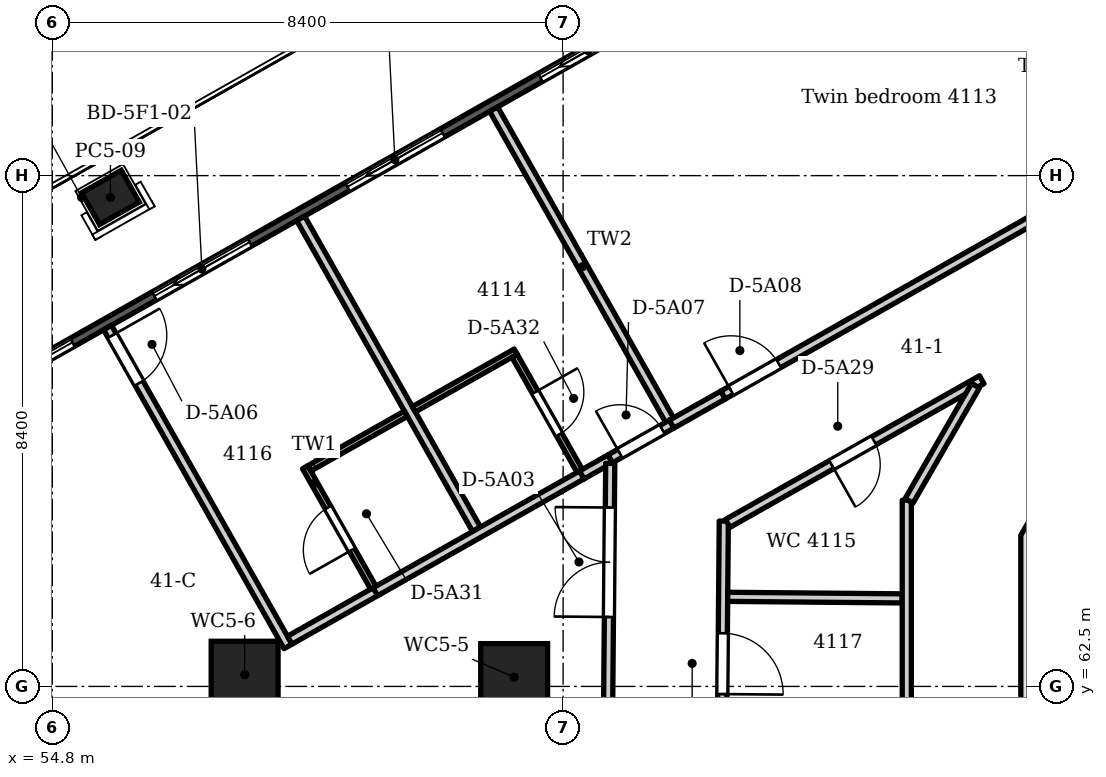
"""IFC4 building model, lengths in metres.
Left out: names, types, materials, properties, quantities, classifications, styles, units other than length and angle.
Written with IfcOpenShell. Run it as: python <this file> out.ifc"""

import sys

from ifc_helpers import new_model, si_unit, direction, frame, frame_2d, origin, origin_2d, place, context, subcontext, project, spatial, polyline, rectangle, circle, outline, extrude, element, fill, save


model = new_model("IFC4")
c1 = context("Model", 3, precision=1e-05, world=origin(), true_north=direction((0.0, 1.0)))
c2 = subcontext(c1, "Body", "Model", "MODEL_VIEW")
j1 = project(units=[si_unit("LENGTHUNIT", "METRE"), si_unit("PLANEANGLEUNIT", "RADIAN")], contexts=[c1])
p1 = place(None, origin())
s1 = spatial("IfcSite", under=j1, at=p1, CompositionType="ELEMENT")
p2 = place(p1, origin())
s2 = spatial("IfcBuilding", under=s1, at=p2, CompositionType="ELEMENT")
p3 = place(p2, frame((0.0, 0.0, 161.1)))
s3 = spatial("IfcBuildingStorey", under=s2, at=p3, CompositionType="ELEMENT", Elevation=161.1)
p4 = place(p3, frame((73.602, 69.063, 0.0), z_axis=(0.0, 0.0, 1.0), x_axis=(-0.500038571144, -0.866003133579, 0.0)))
e1 = element("IfcWall", 1, at=p4, inside=s3, PredefinedType="SHEAR", context=c2, shape_type="SweptSolid", body=[
    extrude(outline(polyline([(0.0, -0.45), (4.969, -0.45), (4.728, 0.45), (0.241, 0.45), (0.0, -0.45)])), origin(), (0.0, 0.0, 1.0), 3.6),
])
p5 = place(p4, frame((1.285, 0.0, 0.0)))
e2 = element("IfcOpeningElement", 2, at=p5, cuts=e1, PredefinedType="OPENING", context=c2, shape_type="SweptSolid", body=[
    extrude(rectangle(XDim=2.4, YDim=2.1, at=frame_2d((1.2, 1.05))), frame((0.0, 0.46, 0.0), z_axis=(0.0, -1.0, 0.0), x_axis=(1.0, 0.0, 0.0)), (0.0, 0.0, 1.0), 0.92),
])
p6 = place(p3, frame((71.177, 64.985, 0.0), z_axis=(0.0, 0.0, 1.0), x_axis=(0.0, -1.0, 0.0)))
e3 = element("IfcWall", 3, at=p6, inside=s3, PredefinedType="SHEAR", context=c2, shape_type="SweptSolid", body=[
    extrude(outline(polyline([(0.0, -0.45), (4.969, -0.45), (4.728, 0.45), (0.241, 0.45), (0.0, -0.45)])), origin(), (0.0, 0.0, 1.0), 3.6),
])
p7 = place(p6, frame((0.894, 0.0, 0.0)))
e4 = element("IfcOpeningElement", 4, at=p7, cuts=e3, PredefinedType="OPENING", context=c2, shape_type="SweptSolid", body=[
    extrude(rectangle(XDim=0.9, YDim=2.1, at=frame_2d((0.45, 1.05))), frame((0.0, 0.46, 0.0), z_axis=(0.0, -1.0, 0.0), x_axis=(1.0, 0.0, 0.0)), (0.0, 0.0, 1.0), 0.92),
])
p8 = place(p6, frame((3.185, 0.0, 0.0)))
e5 = element("IfcOpeningElement", 5, at=p8, cuts=e3, PredefinedType="OPENING", context=c2, shape_type="SweptSolid", body=[
    extrude(rectangle(XDim=0.9, YDim=2.1, at=frame_2d((0.45, 1.05))), frame((0.0, 0.46, 0.0), z_axis=(0.0, -1.0, 0.0), x_axis=(1.0, 0.0, 0.0)), (0.0, 0.0, 1.0), 0.92),
])
p9 = place(p3, frame((55.756, 70.542, -0.35), z_axis=(0.0, 0.0, 1.0), x_axis=(0.87035569594, 0.492423560103, 0.0)))
e6 = element("IfcColumn", 6, at=p9, inside=s3, PredefinedType="COLUMN", context=c2, shape_type="SweptSolid", body=[
    extrude(rectangle(XDim=0.75, YDim=0.6, at=origin_2d()), origin(), (0.0, 0.0, 1.0), 3.95),
])
for number, where, z_axis, x_axis in (
    (7, (62.395, 62.654, -0.35), (0.0, 0.0, 1.0), (1.0, 0.0, 0.0)),
    (8, (57.963, 62.692, -0.35), (0.0, 0.0, 1.0), (1.0, 0.0, 0.0)),
):
    element("IfcColumn", number, at=place(p3, frame(where, z_axis=z_axis, x_axis=x_axis)), inside=s3, PredefinedType="COLUMN", context=c2, shape_type="SweptSolid", body=[
        extrude(circle(Radius=0.55, at=origin_2d()), origin(), (0.0, 0.0, 1.0), 3.95),
    ])
p10 = place(p3, frame((52.498, 66.67, 0.0), z_axis=(0.0, 0.0, 1.0), x_axis=(0.870354973249, 0.492424837453, 0.0)))
e9 = element("IfcWall", 9, at=p10, inside=s3, PredefinedType="SOLIDWALL", context=c2, shape_type="SweptSolid", body=[
    extrude(outline(polyline([(0.149, 0.075), (0.149, -0.075), (43.617, -0.075), (43.617, 0.075), (0.149, 0.075)])), origin(), (0.0, 0.0, 1.0), 3.3),
])
p11 = place(p10, frame((1.224, 0.0, 0.0)))
e10 = element("IfcOpeningElement", 10, at=p11, cuts=e9, PredefinedType="OPENING", context=c2, shape_type="SweptSolid", body=[
    extrude(rectangle(XDim=1.8, YDim=2.6, at=frame_2d((0.9, 1.3))), frame((0.0, 0.085, 0.0), z_axis=(0.0, -1.0, 0.0), x_axis=(1.0, 0.0, 0.0)), (0.0, 0.0, 1.0), 0.17),
])
p12 = place(p10, frame((4.571, 0.0, 0.0)))
e11 = element("IfcOpeningElement", 11, at=p12, cuts=e9, PredefinedType="OPENING", context=c2, shape_type="SweptSolid", body=[
    extrude(rectangle(XDim=1.8, YDim=2.6, at=frame_2d((0.9, 1.3))), frame((0.0, 0.085, 0.0), z_axis=(0.0, -1.0, 0.0), x_axis=(1.0, 0.0, 0.0)), (0.0, 0.0, 1.0), 0.17),
])
p13 = place(p10, frame((8.218, 0.0, 0.0)))
e12 = element("IfcOpeningElement", 12, at=p13, cuts=e9, PredefinedType="OPENING", context=c2, shape_type="SweptSolid", body=[
    extrude(rectangle(XDim=1.8, YDim=2.6, at=frame_2d((0.9, 1.3))), frame((0.0, 0.085, 0.0), z_axis=(0.0, -1.0, 0.0), x_axis=(1.0, 0.0, 0.0)), (0.0, 0.0, 1.0), 0.17),
])
p14 = place(p10, frame((11.865, 0.0, 0.0)))
e13 = element("IfcOpeningElement", 13, at=p14, cuts=e9, PredefinedType="OPENING", context=c2, shape_type="SweptSolid", body=[
    extrude(rectangle(XDim=1.8, YDim=2.6, at=frame_2d((0.9, 1.3))), frame((0.0, 0.085, 0.0), z_axis=(0.0, -1.0, 0.0), x_axis=(1.0, 0.0, 0.0)), (0.0, 0.0, 1.0), 0.17),
])
p15 = place(p10, frame((15.512, 0.0, 0.0)))
e14 = element("IfcOpeningElement", 14, at=p15, cuts=e9, PredefinedType="OPENING", context=c2, shape_type="SweptSolid", body=[
    extrude(rectangle(XDim=1.8, YDim=2.6, at=frame_2d((0.9, 1.3))), frame((0.0, 0.085, 0.0), z_axis=(0.0, -1.0, 0.0), x_axis=(1.0, 0.0, 0.0)), (0.0, 0.0, 1.0), 0.17),
])
p16 = place(p10, frame((19.16, 0.0, 0.0)))
e15 = element("IfcOpeningElement", 15, at=p16, cuts=e9, PredefinedType="OPENING", context=c2, shape_type="SweptSolid", body=[
    extrude(rectangle(XDim=1.8, YDim=2.6, at=frame_2d((0.9, 1.3))), frame((0.0, 0.085, 0.0), z_axis=(0.0, -1.0, 0.0), x_axis=(1.0, 0.0, 0.0)), (0.0, 0.0, 1.0), 0.17),
])
p17 = place(p10, frame((22.807, 0.0, 0.0)))
e16 = element("IfcOpeningElement", 16, at=p17, cuts=e9, PredefinedType="OPENING", context=c2, shape_type="SweptSolid", body=[
    extrude(rectangle(XDim=1.8, YDim=2.6, at=frame_2d((0.9, 1.3))), frame((0.0, 0.085, 0.0), z_axis=(0.0, -1.0, 0.0), x_axis=(1.0, 0.0, 0.0)), (0.0, 0.0, 1.0), 0.17),
])
p18 = place(p10, frame((26.454, 0.0, 0.0)))
e17 = element("IfcOpeningElement", 17, at=p18, cuts=e9, PredefinedType="OPENING", context=c2, shape_type="SweptSolid", body=[
    extrude(rectangle(XDim=1.8, YDim=2.6, at=frame_2d((0.9, 1.3))), frame((0.0, 0.085, 0.0), z_axis=(0.0, -1.0, 0.0), x_axis=(1.0, 0.0, 0.0)), (0.0, 0.0, 1.0), 0.17),
])
p19 = place(p10, frame((30.101, 0.0, 0.0)))
e18 = element("IfcOpeningElement", 18, at=p19, cuts=e9, PredefinedType="OPENING", context=c2, shape_type="SweptSolid", body=[
    extrude(rectangle(XDim=1.8, YDim=2.6, at=frame_2d((0.9, 1.3))), frame((0.0, 0.085, 0.0), z_axis=(0.0, -1.0, 0.0), x_axis=(1.0, 0.0, 0.0)), (0.0, 0.0, 1.0), 0.17),
])
p20 = place(p10, frame((33.748, 0.0, 0.0)))
e19 = element("IfcOpeningElement", 19, at=p20, cuts=e9, PredefinedType="OPENING", context=c2, shape_type="SweptSolid", body=[
    extrude(rectangle(XDim=1.8, YDim=2.6, at=frame_2d((0.9, 1.3))), frame((0.0, 0.085, 0.0), z_axis=(0.0, -1.0, 0.0), x_axis=(1.0, 0.0, 0.0)), (0.0, 0.0, 1.0), 0.17),
])
p21 = place(p10, frame((37.396, 0.0, 0.0)))
e20 = element("IfcOpeningElement", 20, at=p21, cuts=e9, PredefinedType="OPENING", context=c2, shape_type="SweptSolid", body=[
    extrude(rectangle(XDim=1.8, YDim=2.6, at=frame_2d((0.9, 1.3))), frame((0.0, 0.085, 0.0), z_axis=(0.0, -1.0, 0.0), x_axis=(1.0, 0.0, 0.0)), (0.0, 0.0, 1.0), 0.17),
])
p22 = place(p10, frame((40.743, 0.0, 0.0)))
e21 = element("IfcOpeningElement", 21, at=p22, cuts=e9, PredefinedType="OPENING", context=c2, shape_type="SweptSolid", body=[
    extrude(rectangle(XDim=1.8, YDim=2.6, at=frame_2d((0.9, 1.3))), frame((0.0, 0.085, 0.0), z_axis=(0.0, -1.0, 0.0), x_axis=(1.0, 0.0, 0.0)), (0.0, 0.0, 1.0), 0.17),
])
p23 = place(p3, origin())
e22 = element("IfcWall", 22, at=p23, inside=s3, PredefinedType="PARAPET", context=c2, shape_type="SweptSolid", body=[
    extrude(outline(polyline([(74.388, 81.773), (46.836, 70.36), (47.111, 70.149), (72.246, 80.561), (74.388, 81.773)])), origin(), (0.0, 0.0, 1.0), 1.1),
])
p24 = place(p3, frame((55.709, 68.401, 0.0), z_axis=(0.0, 0.0, 1.0), x_axis=(0.492481823802, -0.870322729351, 0.0)))
e23 = element("IfcWall", 23, at=p24, inside=s3, PredefinedType="PARTITIONING", context=c2, shape_type="SweptSolid", body=[
    extrude(rectangle(XDim=6.025, YDim=0.15, at=frame_2d((3.012, 0.0))), origin(), (0.0, 0.0, 1.0), 3.3),
])
p25 = place(p24, frame((0.15, 0.0, 0.0)))
e24 = element("IfcOpeningElement", 24, at=p25, cuts=e23, PredefinedType="OPENING", context=c2, shape_type="SweptSolid", body=[
    extrude(rectangle(XDim=0.9, YDim=2.1, at=frame_2d((0.45, 1.05))), frame((0.0, 0.085, 0.0), z_axis=(0.0, -1.0, 0.0), x_axis=(1.0, 0.0, 0.0)), (0.0, 0.0, 1.0), 0.17),
])
p26 = place(p3, frame((58.704, 63.26, 0.0), z_axis=(0.0, 0.0, 1.0), x_axis=(0.870190857822, 0.492714796778, 0.0)))
e25 = element("IfcWall", 25, at=p26, inside=s3, PredefinedType="PARTITIONING", context=c2, shape_type="SweptSolid", body=[
    extrude(rectangle(XDim=1.676, YDim=0.15, at=frame_2d((0.838, 0.0))), origin(), (0.0, 0.0, 1.0), 3.3),
])
p27 = place(p3, frame((58.884, 70.197, 0.0), z_axis=(0.0, 0.0, 1.0), x_axis=(0.492361245758, -0.870390948756, 0.0)))
e26 = element("IfcWall", 26, at=p27, inside=s3, PredefinedType="PARTITIONING", context=c2, shape_type="SweptSolid", body=[
    extrude(rectangle(XDim=5.875, YDim=0.15, at=frame_2d((2.937, 0.0))), origin(), (0.0, 0.0, 1.0), 3.3),
])
p28 = place(p3, frame((58.958, 66.104, 0.0), z_axis=(0.0, 0.0, 1.0), x_axis=(0.49250622102, -0.870308923462, 0.0)))
e27 = element("IfcWall", 27, at=p28, inside=s3, PredefinedType="PARTITIONING", context=c2, shape_type="SweptSolid", body=[
    extrude(rectangle(XDim=2.275, YDim=0.1, at=frame_2d((1.138, 0.0))), origin(), (0.0, 0.0, 1.0), 3.3),
])
p29 = place(p28, frame((0.763, 0.0, 0.0)))
e28 = element("IfcOpeningElement", 28, at=p29, cuts=e27, PredefinedType="OPENING", context=c2, shape_type="SweptSolid", body=[
    extrude(rectangle(XDim=0.8, YDim=2.1, at=frame_2d((0.4, 1.05))), frame((0.0, 0.06, 0.0), z_axis=(0.0, -1.0, 0.0), x_axis=(1.0, 0.0, 0.0)), (0.0, 0.0, 1.0), 0.12),
])
p30 = place(p3, frame((59.027, 66.086, 0.0), z_axis=(0.0, 0.0, 1.0), x_axis=(0.870375876163, 0.492387889974, 0.0)))
e29 = element("IfcWall", 29, at=p30, inside=s3, PredefinedType="PARTITIONING", context=c2, shape_type="SweptSolid", body=[
    extrude(rectangle(XDim=1.825, YDim=0.1, at=frame_2d((0.912, 0.0))), origin(), (0.0, 0.0, 1.0), 3.3),
])
p31 = place(p3, frame((60.113, 64.057, 0.0), z_axis=(0.0, 0.0, 1.0), x_axis=(0.870300828713, 0.492520524995, 0.0)))
e30 = element("IfcWall", 30, at=p31, inside=s3, PredefinedType="PARTITIONING", context=c2, shape_type="SweptSolid", body=[
    extrude(rectangle(XDim=3.906, YDim=0.15, at=frame_2d((1.953, 0.0))), origin(), (0.0, 0.0, 1.0), 3.3),
])
p32 = place(p3, frame((60.745, 67.058, 0.0), z_axis=(0.0, 0.0, 1.0), x_axis=(0.870465997858, 0.492228551156, 0.0)))
e31 = element("IfcWall", 31, at=p32, inside=s3, PredefinedType="PARTITIONING", context=c2, shape_type="SweptSolid", body=[
    extrude(rectangle(XDim=1.926, YDim=0.1, at=frame_2d((0.963, 0.0))), origin(), (0.0, 0.0, 1.0), 3.3),
])
p33 = place(p3, frame((62.058, 71.993, 0.0), z_axis=(0.0, 0.0, 1.0), x_axis=(0.492391211334, -0.870373997199, 0.0)))
e32 = element("IfcWall", 32, at=p33, inside=s3, PredefinedType="PARTITIONING", context=c2, shape_type="SweptSolid", body=[
    extrude(rectangle(XDim=5.949, YDim=0.15, at=frame_2d((2.975, 0.0))), origin(), (0.0, 0.0, 1.0), 3.3),
])
p34 = place(p3, frame((62.403, 67.938, 0.0), z_axis=(0.0, 0.0, 1.0), x_axis=(0.492205197529, -0.870479203385, 0.0)))
e33 = element("IfcWall", 33, at=p34, inside=s3, PredefinedType="PARTITIONING", context=c2, shape_type="SweptSolid", body=[
    extrude(rectangle(XDim=2.175, YDim=0.1, at=frame_2d((1.087, 0.0))), origin(), (0.0, 0.0, 1.0), 3.3),
])
p35 = place(p34, frame((0.688, 0.0, 0.0)))
e34 = element("IfcOpeningElement", 34, at=p35, cuts=e33, PredefinedType="OPENING", context=c2, shape_type="SweptSolid", body=[
    extrude(rectangle(XDim=0.8, YDim=2.1, at=frame_2d((0.4, 1.05))), frame((0.0, 0.06, 0.0), z_axis=(0.0, -1.0, 0.0), x_axis=(1.0, 0.0, 0.0)), (0.0, 0.0, 1.0), 0.12),
])
p36 = place(p3, frame((63.507, 65.977, 0.0), z_axis=(0.0, 0.0, 1.0), x_axis=(0.869938000449, 0.493161104888, 0.0)))
e35 = element("IfcWall", 35, at=p36, inside=s3, PredefinedType="PARTITIONING", context=c2, shape_type="SweptSolid", body=[
    extrude(rectangle(XDim=0.539, YDim=0.15, at=frame_2d((0.27, 0.0))), origin(), (0.0, 0.0, 1.0), 3.3),
])
p37 = place(p3, frame((63.932, 61.183, 0.0), z_axis=(0.0, 0.0, 1.0), x_axis=(0.008717466764, 0.999962002165, 0.0)))
e36 = element("IfcWall", 36, at=p37, inside=s3, PredefinedType="PARTITIONING", context=c2, shape_type="SweptSolid", body=[
    extrude(rectangle(XDim=4.985, YDim=0.15, at=frame_2d((2.493, 0.0))), origin(), (0.0, 0.0, 1.0), 2.75),
])
p38 = place(p37, frame((2.459, 0.0, 0.0)))
e37 = element("IfcOpeningElement", 37, at=p38, cuts=e36, PredefinedType="OPENING", context=c2, shape_type="SweptSolid", body=[
    extrude(rectangle(XDim=1.8, YDim=2.1, at=frame_2d((0.9, 1.05))), frame((0.0, 0.085, 0.0), z_axis=(0.0, -1.0, 0.0), x_axis=(1.0, 0.0, 0.0)), (0.0, 0.0, 1.0), 0.17),
])
p39 = place(p3, frame((63.976, 66.243, 0.0), z_axis=(0.0, 0.0, 1.0), x_axis=(0.870234820761, 0.492637145102, 0.0)))
e38 = element("IfcWall", 38, at=p39, inside=s3, PredefinedType="PARTITIONING", context=c2, shape_type="SweptSolid", body=[
    extrude(rectangle(XDim=1.165, YDim=0.15, at=frame_2d((0.583, 0.0))), origin(), (0.0, 0.0, 1.0), 3.3),
])
p40 = place(p39, frame((0.181, 0.0, 0.0)))
e39 = element("IfcOpeningElement", 39, at=p40, cuts=e38, PredefinedType="OPENING", context=c2, shape_type="SweptSolid", body=[
    extrude(rectangle(XDim=0.8, YDim=2.1, at=frame_2d((0.4, 1.05))), frame((0.0, 0.085, 0.0), z_axis=(0.0, -1.0, 0.0), x_axis=(1.0, 0.0, 0.0)), (0.0, 0.0, 1.0), 0.17),
])
p41 = place(p3, frame((64.984, 66.813, 0.0), z_axis=(0.0, 0.0, 1.0), x_axis=(0.870488073498, 0.492189510145, 0.0)))
e40 = element("IfcWall", 40, at=p41, inside=s3, PredefinedType="PARTITIONING", context=c2, shape_type="SweptSolid", body=[
    extrude(rectangle(XDim=0.973, YDim=0.15, at=frame_2d((0.487, 0.0))), origin(), (0.0, 0.0, 1.0), 3.3),
])
p42 = place(p3, frame((65.812, 61.695, 0.0), z_axis=(0.0, 0.0, 1.0), x_axis=(0.008521236962, 0.999963693601, 0.0)))
e41 = element("IfcWall", 41, at=p42, inside=s3, PredefinedType="PARTITIONING", context=c2, shape_type="SweptSolid", body=[
    extrude(rectangle(XDim=3.524, YDim=0.15, at=frame_2d((1.762, 0.0))), origin(), (0.0, 0.0, 1.0), 2.75),
])
p43 = place(p42, frame((0.679, 0.0, 0.0)))
e42 = element("IfcOpeningElement", 42, at=p43, cuts=e41, PredefinedType="OPENING", context=c2, shape_type="SweptSolid", body=[
    extrude(rectangle(XDim=1.0, YDim=2.1, at=frame_2d((0.5, 1.05))), frame((0.0, 0.085, 0.0), z_axis=(0.0, -1.0, 0.0), x_axis=(1.0, 0.0, 0.0)), (0.0, 0.0, 1.0), 0.17),
])
p44 = place(p3, frame((65.831, 67.292, 0.0), z_axis=(0.0, 0.0, 1.0), x_axis=(0.870315513683, 0.492494575242, 0.0)))
e43 = element("IfcWall", 43, at=p44, inside=s3, PredefinedType="PARTITIONING", context=c2, shape_type="SweptSolid", body=[
    extrude(rectangle(XDim=6.934, YDim=0.15, at=frame_2d((3.467, 0.0))), origin(), (0.0, 0.0, 1.0), 3.3),
])
p45 = place(p44, frame((0.15, 0.0, 0.0)))
e44 = element("IfcOpeningElement", 44, at=p45, cuts=e43, PredefinedType="OPENING", context=c2, shape_type="SweptSolid", body=[
    extrude(rectangle(XDim=0.9, YDim=2.1, at=frame_2d((0.45, 1.05))), frame((0.0, 0.085, 0.0), z_axis=(0.0, -1.0, 0.0), x_axis=(1.0, 0.0, 0.0)), (0.0, 0.0, 1.0), 0.17),
])
p46 = place(p3, frame((65.907, 63.973, 0.0), z_axis=(0.0, 0.0, 1.0), x_axis=(0.999960115563, -0.008931253159, 0.0)))
e45 = element("IfcWall", 45, at=p46, inside=s3, PredefinedType="PARTITIONING", context=c2, shape_type="SweptSolid", body=[
    extrude(rectangle(XDim=2.87, YDim=0.15, at=frame_2d((1.435, 0.0))), origin(), (0.0, 0.0, 1.0), 3.3),
])
p47 = place(p3, frame((65.907, 65.181, 0.0), z_axis=(0.0, 0.0, 1.0), x_axis=(0.870373278687, 0.492392481408, 0.0)))
e46 = element("IfcWall", 46, at=p47, inside=s3, PredefinedType="PARTITIONING", context=c2, shape_type="SweptSolid", body=[
    extrude(rectangle(XDim=4.799, YDim=0.15, at=frame_2d((2.399, 0.0))), origin(), (0.0, 0.0, 1.0), 3.3),
])
p48 = place(p47, frame((1.962, 0.0, 0.0)))
e47 = element("IfcOpeningElement", 47, at=p48, cuts=e46, PredefinedType="OPENING", context=c2, shape_type="SweptSolid", body=[
    extrude(rectangle(XDim=0.8, YDim=2.1, at=frame_2d((0.4, 1.05))), frame((0.0, 0.085, 0.0), z_axis=(0.0, -1.0, 0.0), x_axis=(1.0, 0.0, 0.0)), (0.0, 0.0, 1.0), 0.17),
])
p49 = place(p3, frame((68.852, 59.438, 0.0), z_axis=(0.0, 0.0, 1.0), x_axis=(0.0, 1.0, 0.0)))
e48 = element("IfcWall", 48, at=p49, inside=s3, PredefinedType="PARTITIONING", context=c2, shape_type="SweptSolid", body=[
    extrude(rectangle(XDim=6.124, YDim=0.15, at=frame_2d((3.062, 0.0))), origin(), (0.0, 0.0, 1.0), 2.75),
])
p50 = place(p3, frame((68.889, 65.552, 0.0), z_axis=(0.0, 0.0, 1.0), x_axis=(0.499825543119, 0.866126103086, 0.0)))
e49 = element("IfcWall", 49, at=p50, inside=s3, PredefinedType="PARTITIONING", context=c2, shape_type="SweptSolid", body=[
    extrude(rectangle(XDim=2.187, YDim=0.15, at=frame_2d((1.093, 0.0))), origin(), (0.0, 0.0, 1.0), 3.3),
])
p51 = place(p11, origin())
e50 = element("IfcDoor", 50, at=p51, inside=s3, OperationType="SLIDING_TO_LEFT", PredefinedType="DOOR", context=c2, shape_type="SweptSolid", body=[
    extrude(rectangle(XDim=1.8, YDim=2.6, at=frame_2d((0.9, 1.3))), frame((0.0, 0.025, 0.0), z_axis=(0.0, -1.0, 0.0), x_axis=(1.0, 0.0, 0.0)), (0.0, 0.0, 1.0), 0.05),
])
fill(e10, e50)
p52 = place(p12, origin())
e51 = element("IfcDoor", 51, at=p52, inside=s3, OperationType="SLIDING_TO_LEFT", PredefinedType="DOOR", context=c2, shape_type="SweptSolid", body=[
    extrude(rectangle(XDim=1.8, YDim=2.6, at=frame_2d((0.9, 1.3))), frame((0.0, 0.025, 0.0), z_axis=(0.0, -1.0, 0.0), x_axis=(1.0, 0.0, 0.0)), (0.0, 0.0, 1.0), 0.05),
])
fill(e11, e51)
p53 = place(p13, origin())
e52 = element("IfcDoor", 52, at=p53, inside=s3, OperationType="SLIDING_TO_LEFT", PredefinedType="DOOR", context=c2, shape_type="SweptSolid", body=[
    extrude(rectangle(XDim=1.8, YDim=2.6, at=frame_2d((0.9, 1.3))), frame((0.0, 0.025, 0.0), z_axis=(0.0, -1.0, 0.0), x_axis=(1.0, 0.0, 0.0)), (0.0, 0.0, 1.0), 0.05),
])
fill(e12, e52)
p54 = place(p14, origin())
e53 = element("IfcDoor", 53, at=p54, inside=s3, OperationType="SLIDING_TO_LEFT", PredefinedType="DOOR", context=c2, shape_type="SweptSolid", body=[
    extrude(rectangle(XDim=1.8, YDim=2.6, at=frame_2d((0.9, 1.3))), frame((0.0, 0.025, 0.0), z_axis=(0.0, -1.0, 0.0), x_axis=(1.0, 0.0, 0.0)), (0.0, 0.0, 1.0), 0.05),
])
fill(e13, e53)
p55 = place(p38, origin())
e54 = element("IfcDoor", 54, at=p55, inside=s3, OperationType="DOUBLE_DOOR_DOUBLE_SWING", PredefinedType="DOOR", context=c2, shape_type="SweptSolid", body=[
    extrude(rectangle(XDim=1.8, YDim=2.1, at=frame_2d((0.9, 1.05))), frame((0.0, 0.025, 0.0), z_axis=(0.0, -1.0, 0.0), x_axis=(1.0, 0.0, 0.0)), (0.0, 0.0, 1.0), 0.05),
])
fill(e37, e54)
p56 = place(p25, origin())
e55 = element("IfcDoor", 55, at=p56, inside=s3, OperationType="SINGLE_SWING_LEFT", PredefinedType="DOOR", context=c2, shape_type="SweptSolid", body=[
    extrude(rectangle(XDim=0.9, YDim=2.1, at=frame_2d((0.45, 1.05))), frame((0.0, 0.025, 0.0), z_axis=(0.0, -1.0, 0.0), x_axis=(1.0, 0.0, 0.0)), (0.0, 0.0, 1.0), 0.05),
])
fill(e24, e55)
p57 = place(p40, origin())
e56 = element("IfcDoor", 56, at=p57, inside=s3, OperationType="SINGLE_SWING_LEFT", PredefinedType="DOOR", context=c2, shape_type="SweptSolid", body=[
    extrude(rectangle(XDim=0.8, YDim=2.1, at=frame_2d((0.4, 1.05))), frame((0.0, 0.025, 0.0), z_axis=(0.0, -1.0, 0.0), x_axis=(1.0, 0.0, 0.0)), (0.0, 0.0, 1.0), 0.05),
])
fill(e39, e56)
p58 = place(p45, origin())
e57 = element("IfcDoor", 57, at=p58, inside=s3, OperationType="SINGLE_SWING_LEFT", PredefinedType="DOOR", context=c2, shape_type="SweptSolid", body=[
    extrude(rectangle(XDim=0.9, YDim=2.1, at=frame_2d((0.45, 1.05))), frame((0.0, 0.025, 0.0), z_axis=(0.0, -1.0, 0.0), x_axis=(1.0, 0.0, 0.0)), (0.0, 0.0, 1.0), 0.05),
])
fill(e44, e57)
p59 = place(p48, frame((0.8, 0.0, 0.0), z_axis=(0.0, 0.0, 1.0), x_axis=(-1.0, 0.0, 0.0)))
e58 = element("IfcDoor", 58, at=p59, inside=s3, OperationType="SINGLE_SWING_RIGHT", PredefinedType="DOOR", context=c2, shape_type="SweptSolid", body=[
    extrude(rectangle(XDim=0.8, YDim=2.1, at=frame_2d((0.4, 1.05))), frame((0.0, 0.025, 0.0), z_axis=(0.0, -1.0, 0.0), x_axis=(1.0, 0.0, 0.0)), (0.0, 0.0, 1.0), 0.05),
])
fill(e47, e58)
p60 = place(p43, frame((1.0, 0.0, 0.0), z_axis=(0.0, 0.0, 1.0), x_axis=(-1.0, 0.0, 0.0)))
e59 = element("IfcDoor", 59, at=p60, inside=s3, OperationType="SINGLE_SWING_RIGHT", PredefinedType="DOOR", context=c2, shape_type="SweptSolid", body=[
    extrude(rectangle(XDim=1.0, YDim=2.1, at=frame_2d((0.5, 1.05))), frame((0.0, 0.025, 0.0), z_axis=(0.0, -1.0, 0.0), x_axis=(1.0, 0.0, 0.0)), (0.0, 0.0, 1.0), 0.05),
])
fill(e42, e59)
p61 = place(p29, frame((0.8, 0.0, 0.0), z_axis=(0.0, 0.0, 1.0), x_axis=(-1.0, 0.0, 0.0)))
e60 = element("IfcDoor", 60, at=p61, inside=s3, OperationType="SINGLE_SWING_LEFT", PredefinedType="DOOR", context=c2, shape_type="SweptSolid", body=[
    extrude(rectangle(XDim=0.8, YDim=2.1, at=frame_2d((0.4, 1.05))), frame((0.0, 0.025, 0.0), z_axis=(0.0, -1.0, 0.0), x_axis=(1.0, 0.0, 0.0)), (0.0, 0.0, 1.0), 0.05),
])
fill(e28, e60)
p62 = place(p35, origin())
e61 = element("IfcDoor", 61, at=p62, inside=s3, OperationType="SINGLE_SWING_LEFT", PredefinedType="DOOR", context=c2, shape_type="SweptSolid", body=[
    extrude(rectangle(XDim=0.8, YDim=2.1, at=frame_2d((0.4, 1.05))), frame((0.0, 0.025, 0.0), z_axis=(0.0, -1.0, 0.0), x_axis=(1.0, 0.0, 0.0)), (0.0, 0.0, 1.0), 0.05),
])
fill(e34, e61)
save(model, sys.argv[1])
